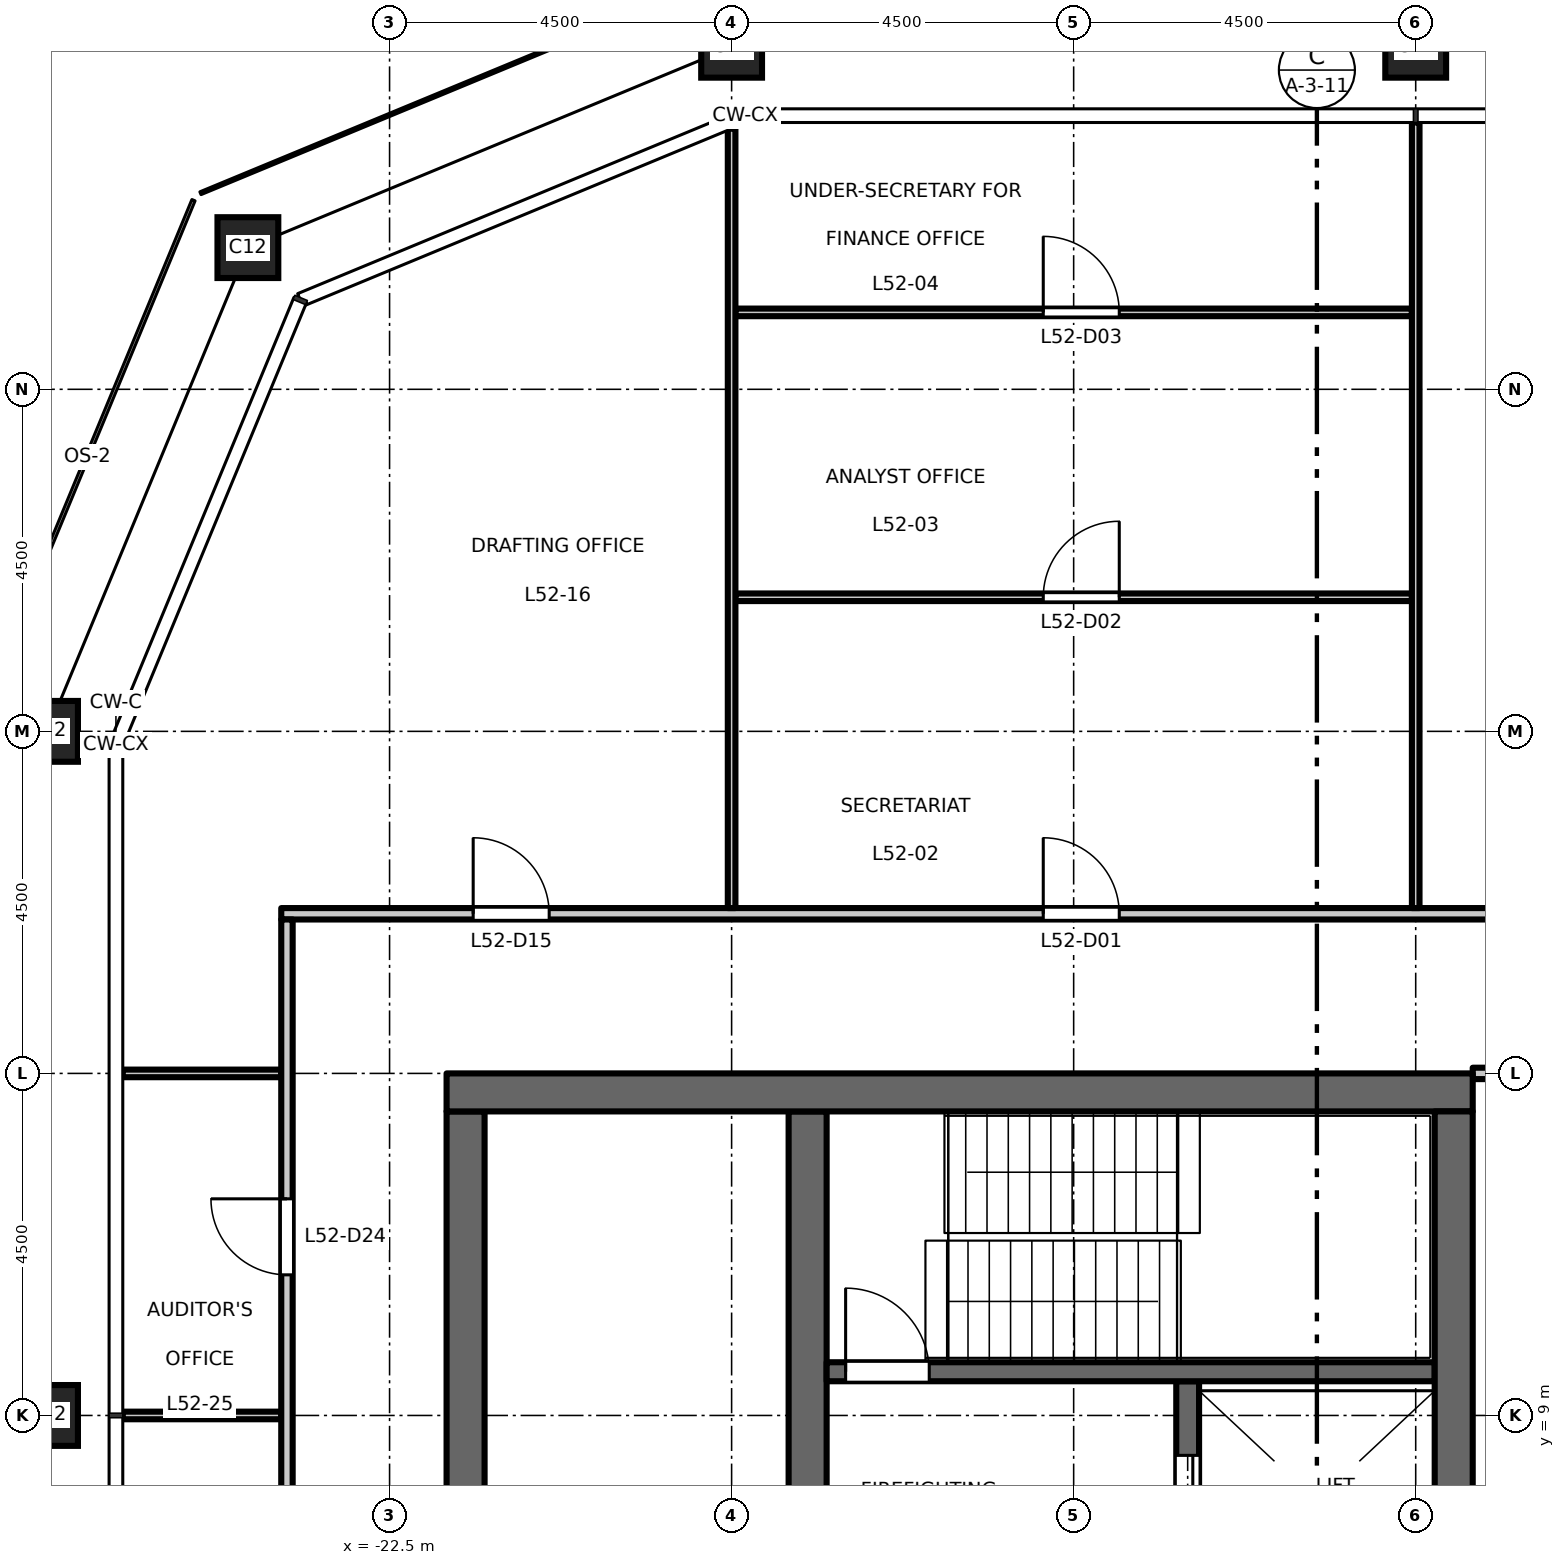
"""IFC4 building model, lengths in metres.
Left out: names, types, materials, properties, quantities, classifications, styles, units other than length and angle.
Written with IfcOpenShell. Run it as: python <this file> out.ifc"""

import sys

from ifc_helpers import new_model, si_unit, direction, frame, frame_2d, origin, origin_2d, place, context, subcontext, project, spatial, rectangle, hollow_rectangle, extrude, element, fill, save


model = new_model("IFC4")
c1 = context("Model", 3, precision=1e-05, world=origin(), true_north=direction((0.0, 1.0)))
c2 = subcontext(c1, "Body", "Model", "MODEL_VIEW")
j1 = project(units=[si_unit("LENGTHUNIT", "METRE"), si_unit("PLANEANGLEUNIT", "RADIAN")], contexts=[c1])
p1 = place(None, origin())
s1 = spatial("IfcSite", under=j1, at=p1, CompositionType="ELEMENT")
p2 = place(p1, origin())
s2 = spatial("IfcBuilding", under=s1, at=p2, CompositionType="ELEMENT")
p3 = place(p2, frame((0.0, 0.0, 242.2)))
s3 = spatial("IfcBuildingStorey", under=s2, at=p3, CompositionType="ELEMENT", Elevation=242.2)
for number, where, z_axis, x_axis in (
    (1, (-9.0, 27.0, 0.0), (0.0, 0.0, 1.0), (1.0, 0.0, 0.0)),
    (2, (-18.0, 27.0, 0.0), (0.0, 0.0, 1.0), (1.0, 0.0, 0.0)),
    (3, (-24.364, 24.364, 0.0), (0.0, 0.0, 1.0), (1.0, 0.0, 0.0)),
    (4, (-27.0, 18.0, 0.0), (0.0, 0.0, 1.0), (1.0, 0.0, 0.0)),
    (5, (-27.0, 9.0, 0.0), (0.0, 0.0, 1.0), (1.0, 0.0, 0.0)),
):
    element("IfcColumn", number, at=place(p3, frame(where, z_axis=z_axis, x_axis=x_axis)), inside=s3, PredefinedType="COLUMN", context=c2, shape_type="SweptSolid", body=[
        extrude(hollow_rectangle(XDim=0.8, YDim=0.8, WallThickness=0.045, at=origin_2d()), origin(), (0.0, 0.0, 1.0), 4.5),
    ])
p4 = place(p3, frame((-12.0, -9.45, 0.0), z_axis=(0.0, 0.0, 1.0), x_axis=(0.0, 1.0, 0.0)))
e6 = element("IfcWall", 6, at=p4, inside=s3, PredefinedType="SHEAR", context=c2, shape_type="SweptSolid", body=[
    extrude(rectangle(XDim=18.9, YDim=0.3, at=frame_2d((9.45, 0.0))), origin(), (0.0, 0.0, 1.0), 4.35),
])
p5 = place(p4, frame((4.725, 0.0, 0.0)))
e7 = element("IfcOpeningElement", 7, at=p5, cuts=e6, PredefinedType="OPENING", context=c2, shape_type="SweptSolid", body=[
    extrude(rectangle(XDim=1.1, YDim=2.1, at=frame_2d((0.55, 1.05))), frame((0.0, 0.16, 0.0), z_axis=(0.0, -1.0, 0.0), x_axis=(1.0, 0.0, 0.0)), (0.0, 0.0, 1.0), 0.32),
])
p6 = place(p4, frame((7.875, 0.0, 0.0)))
e8 = element("IfcOpeningElement", 8, at=p6, cuts=e6, PredefinedType="OPENING", context=c2, shape_type="SweptSolid", body=[
    extrude(rectangle(XDim=1.1, YDim=2.1, at=frame_2d((0.55, 1.05))), frame((0.0, 0.16, 0.0), z_axis=(0.0, -1.0, 0.0), x_axis=(1.0, 0.0, 0.0)), (0.0, 0.0, 1.0), 0.32),
])
p7 = place(p4, frame((11.025, 0.0, 0.0)))
e9 = element("IfcOpeningElement", 9, at=p7, cuts=e6, PredefinedType="OPENING", context=c2, shape_type="SweptSolid", body=[
    extrude(rectangle(XDim=1.1, YDim=2.1, at=frame_2d((0.55, 1.05))), frame((0.0, 0.16, 0.0), z_axis=(0.0, -1.0, 0.0), x_axis=(1.0, 0.0, 0.0)), (0.0, 0.0, 1.0), 0.32),
])
p8 = place(p4, frame((14.175, 0.0, 0.0)))
e10 = element("IfcOpeningElement", 10, at=p8, cuts=e6, PredefinedType="OPENING", context=c2, shape_type="SweptSolid", body=[
    extrude(rectangle(XDim=1.1, YDim=2.1, at=frame_2d((0.55, 1.05))), frame((0.0, 0.16, 0.0), z_axis=(0.0, -1.0, 0.0), x_axis=(1.0, 0.0, 0.0)), (0.0, 0.0, 1.0), 0.32),
])
p9 = place(p4, frame((16.725, 0.0, 0.0)))
e11 = element("IfcOpeningElement", 11, at=p9, cuts=e6, PredefinedType="OPENING", context=c2, shape_type="SweptSolid", body=[
    extrude(rectangle(XDim=1.2, YDim=2.1, at=frame_2d((0.6, 1.05))), frame((0.0, 0.16, 0.0), z_axis=(0.0, -1.0, 0.0), x_axis=(1.0, 0.0, 0.0)), (0.0, 0.0, 1.0), 0.32),
])
p10 = place(p4, frame((0.975, 0.0, 0.0)))
e12 = element("IfcOpeningElement", 12, at=p10, cuts=e6, PredefinedType="OPENING", context=c2, shape_type="SweptSolid", body=[
    extrude(rectangle(XDim=1.2, YDim=2.1, at=frame_2d((0.6, 1.05))), frame((0.0, 0.16, 0.0), z_axis=(0.0, -1.0, 0.0), x_axis=(1.0, 0.0, 0.0)), (0.0, 0.0, 1.0), 0.32),
])
p11 = place(p3, frame((-21.5, -13.0, 0.0), z_axis=(0.0, 0.0, 1.0), x_axis=(0.0, 1.0, 0.0)))
e13 = element("IfcWall", 13, at=p11, inside=s3, PredefinedType="SHEAR", context=c2, shape_type="SweptSolid", body=[
    extrude(rectangle(XDim=26.0, YDim=0.5, at=frame_2d((13.0, 0.0))), origin(), (0.0, 0.0, 1.0), 4.35),
])
p12 = place(p11, frame((16.825, 0.0, 0.0)))
e14 = element("IfcOpeningElement", 14, at=p12, cuts=e13, PredefinedType="OPENING", context=c2, shape_type="SweptSolid", body=[
    extrude(rectangle(XDim=1.8, YDim=2.1, at=frame_2d((0.9, 1.05))), frame((0.0, 0.26, 0.0), z_axis=(0.0, -1.0, 0.0), x_axis=(1.0, 0.0, 0.0)), (0.0, 0.0, 1.0), 0.52),
])
p13 = place(p11, frame((7.375, 0.0, 0.0)))
e15 = element("IfcOpeningElement", 15, at=p13, cuts=e13, PredefinedType="OPENING", context=c2, shape_type="SweptSolid", body=[
    extrude(rectangle(XDim=1.8, YDim=2.1, at=frame_2d((0.9, 1.05))), frame((0.0, 0.26, 0.0), z_axis=(0.0, -1.0, 0.0), x_axis=(1.0, 0.0, 0.0)), (0.0, 0.0, 1.0), 0.52),
])
p14 = place(p3, frame((-17.0, 6.425, 0.0), z_axis=(0.0, 0.0, 1.0), x_axis=(0.0, 1.0, 0.0)))
e16 = element("IfcWall", 16, at=p14, inside=s3, PredefinedType="SHEAR", context=c2, shape_type="SweptSolid", body=[
    extrude(rectangle(XDim=6.575, YDim=0.5, at=frame_2d((3.288, 0.0))), origin(), (0.0, 0.0, 1.0), 4.35),
])
p15 = place(p3, frame((-8.75, 9.575, 0.0), z_axis=(0.0, 0.0, 1.0), x_axis=(-1.0, 0.0, 0.0)))
e17 = element("IfcWall", 17, at=p15, inside=s3, PredefinedType="SHEAR", context=c2, shape_type="SweptSolid", body=[
    extrude(rectangle(XDim=8.0, YDim=0.25, at=frame_2d((4.0, 0.0))), origin(), (0.0, 0.0, 1.0), 4.35),
])
p16 = place(p15, frame((6.65, 0.0, 0.0)))
e18 = element("IfcOpeningElement", 18, at=p16, cuts=e17, PredefinedType="OPENING", context=c2, shape_type="SweptSolid", body=[
    extrude(rectangle(XDim=1.1, YDim=2.1, at=frame_2d((0.55, 1.05))), frame((0.0, 0.135, 0.0), z_axis=(0.0, -1.0, 0.0), x_axis=(1.0, 0.0, 0.0)), (0.0, 0.0, 1.0), 0.27),
])
p17 = place(p3, frame((-8.25, 13.25, 0.0), z_axis=(0.0, 0.0, 1.0), x_axis=(-1.0, 0.0, 0.0)))
e19 = element("IfcWall", 19, at=p17, inside=s3, PredefinedType="SHEAR", context=c2, shape_type="SweptSolid", body=[
    extrude(rectangle(XDim=13.5, YDim=0.5, at=frame_2d((6.75, 0.0))), origin(), (0.0, 0.0, 1.0), 4.35),
])
p18 = place(p3, frame((-8.5, -13.0, 0.0), z_axis=(0.0, 0.0, 1.0), x_axis=(0.0, 1.0, 0.0)))
e20 = element("IfcWall", 20, at=p18, inside=s3, PredefinedType="SHEAR", context=c2, shape_type="SweptSolid", body=[
    extrude(rectangle(XDim=26.0, YDim=0.5, at=frame_2d((13.0, 0.0))), origin(), (0.0, 0.0, 1.0), 4.35),
])
for number, where, z_axis, x_axis in (
    (21, (-26.01, 9.0, 0.0), (0.0, 0.0, 1.0), (1.0, 0.0, 0.0)),
    (22, (-26.01, 13.5, 0.0), (0.0, 0.0, 1.0), (1.0, 0.0, 0.0)),
):
    element("IfcWall", number, at=place(p3, frame(where, z_axis=z_axis, x_axis=x_axis)), inside=s3, PredefinedType="PARTITIONING", context=c2, shape_type="SweptSolid", body=[
        extrude(rectangle(XDim=2.085, YDim=0.1, at=frame_2d((1.042, 0.0))), origin(), (0.0, 0.0, 1.0), 4.35),
    ])
p19 = place(p3, frame((-8.25, 13.5, 0.0), z_axis=(0.0, 0.0, 1.0), x_axis=(1.0, 0.0, 0.0)))
e23 = element("IfcWall", 23, at=p19, inside=s3, PredefinedType="PARTITIONING", context=c2, shape_type="SweptSolid", body=[
    extrude(rectangle(XDim=16.5, YDim=0.15, at=frame_2d((8.25, 0.0))), origin(), (0.0, 0.0, 1.0), 4.35),
])
p20 = place(p19, frame((3.65, 0.0, 0.0)))
e24 = element("IfcOpeningElement", 24, at=p20, cuts=e23, PredefinedType="OPENING", context=c2, shape_type="SweptSolid", body=[
    extrude(rectangle(XDim=1.0, YDim=2.1, at=frame_2d((0.5, 1.05))), frame((0.0, 0.085, 0.0), z_axis=(0.0, -1.0, 0.0), x_axis=(1.0, 0.0, 0.0)), (0.0, 0.0, 1.0), 0.17),
])
p21 = place(p19, frame((11.9, 0.0, 0.0)))
e25 = element("IfcOpeningElement", 25, at=p21, cuts=e23, PredefinedType="OPENING", context=c2, shape_type="SweptSolid", body=[
    extrude(rectangle(XDim=1.0, YDim=2.1, at=frame_2d((0.5, 1.05))), frame((0.0, 0.085, 0.0), z_axis=(0.0, -1.0, 0.0), x_axis=(1.0, 0.0, 0.0)), (0.0, 0.0, 1.0), 0.17),
])
p22 = place(p3, frame((-23.925, 15.6, 0.0), z_axis=(0.0, 0.0, 1.0), x_axis=(1.0, 0.0, 0.0)))
e26 = element("IfcWall", 26, at=p22, inside=s3, PredefinedType="PARTITIONING", context=c2, shape_type="SweptSolid", body=[
    extrude(rectangle(XDim=47.85, YDim=0.15, at=frame_2d((23.925, 0.0))), origin(), (0.0, 0.0, 1.0), 4.35),
])
p23 = place(p22, frame((10.025, 0.0, 0.0)))
e27 = element("IfcOpeningElement", 27, at=p23, cuts=e26, PredefinedType="OPENING", context=c2, shape_type="SweptSolid", body=[
    extrude(rectangle(XDim=1.0, YDim=2.1, at=frame_2d((0.5, 1.05))), frame((0.0, 0.085, 0.0), z_axis=(0.0, -1.0, 0.0), x_axis=(1.0, 0.0, 0.0)), (0.0, 0.0, 1.0), 0.17),
])
p24 = place(p22, frame((19.025, 0.0, 0.0)))
e28 = element("IfcOpeningElement", 28, at=p24, cuts=e26, PredefinedType="OPENING", context=c2, shape_type="SweptSolid", body=[
    extrude(rectangle(XDim=1.0, YDim=2.1, at=frame_2d((0.5, 1.05))), frame((0.0, 0.085, 0.0), z_axis=(0.0, -1.0, 0.0), x_axis=(1.0, 0.0, 0.0)), (0.0, 0.0, 1.0), 0.17),
])
p25 = place(p22, frame((28.025, 0.0, 0.0)))
e29 = element("IfcOpeningElement", 29, at=p25, cuts=e26, PredefinedType="OPENING", context=c2, shape_type="SweptSolid", body=[
    extrude(rectangle(XDim=1.0, YDim=2.1, at=frame_2d((0.5, 1.05))), frame((0.0, 0.085, 0.0), z_axis=(0.0, -1.0, 0.0), x_axis=(1.0, 0.0, 0.0)), (0.0, 0.0, 1.0), 0.17),
])
p26 = place(p22, frame((37.025, 0.0, 0.0)))
e30 = element("IfcOpeningElement", 30, at=p26, cuts=e26, PredefinedType="OPENING", context=c2, shape_type="SweptSolid", body=[
    extrude(rectangle(XDim=1.0, YDim=2.1, at=frame_2d((0.5, 1.05))), frame((0.0, 0.085, 0.0), z_axis=(0.0, -1.0, 0.0), x_axis=(1.0, 0.0, 0.0)), (0.0, 0.0, 1.0), 0.17),
])
p27 = place(p22, frame((2.525, 0.0, 0.0)))
e31 = element("IfcOpeningElement", 31, at=p27, cuts=e26, PredefinedType="OPENING", context=c2, shape_type="SweptSolid", body=[
    extrude(rectangle(XDim=1.0, YDim=2.1, at=frame_2d((0.5, 1.05))), frame((0.0, 0.085, 0.0), z_axis=(0.0, -1.0, 0.0), x_axis=(1.0, 0.0, 0.0)), (0.0, 0.0, 1.0), 0.17),
])
p28 = place(p22, frame((44.375, 0.0, 0.0)))
e32 = element("IfcOpeningElement", 32, at=p28, cuts=e26, PredefinedType="OPENING", context=c2, shape_type="SweptSolid", body=[
    extrude(rectangle(XDim=1.0, YDim=2.1, at=frame_2d((0.5, 1.05))), frame((0.0, 0.085, 0.0), z_axis=(0.0, -1.0, 0.0), x_axis=(1.0, 0.0, 0.0)), (0.0, 0.0, 1.0), 0.17),
])
p29 = place(p3, frame((-17.95, 19.764, 0.0), z_axis=(0.0, 0.0, 1.0), x_axis=(1.0, 0.0, 0.0)))
e33 = element("IfcWall", 33, at=p29, inside=s3, PredefinedType="PARTITIONING", context=c2, shape_type="SweptSolid", body=[
    extrude(rectangle(XDim=8.9, YDim=0.1, at=frame_2d((4.45, 0.0))), origin(), (0.0, 0.0, 1.0), 4.35),
])
p30 = place(p29, frame((4.05, 0.0, 0.0)))
e34 = element("IfcOpeningElement", 34, at=p30, cuts=e33, PredefinedType="OPENING", context=c2, shape_type="SweptSolid", body=[
    extrude(rectangle(XDim=1.0, YDim=2.1, at=frame_2d((0.5, 1.05))), frame((0.0, 0.06, 0.0), z_axis=(0.0, -1.0, 0.0), x_axis=(1.0, 0.0, 0.0)), (0.0, 0.0, 1.0), 0.12),
])
p31 = place(p3, frame((-17.95, 23.512, 0.0), z_axis=(0.0, 0.0, 1.0), x_axis=(1.0, 0.0, 0.0)))
e35 = element("IfcWall", 35, at=p31, inside=s3, PredefinedType="PARTITIONING", context=c2, shape_type="SweptSolid", body=[
    extrude(rectangle(XDim=8.9, YDim=0.1, at=frame_2d((4.45, 0.0))), origin(), (0.0, 0.0, 1.0), 4.35),
])
p32 = place(p31, frame((4.05, 0.0, 0.0)))
e36 = element("IfcOpeningElement", 36, at=p32, cuts=e35, PredefinedType="OPENING", context=c2, shape_type="SweptSolid", body=[
    extrude(rectangle(XDim=1.0, YDim=2.1, at=frame_2d((0.5, 1.05))), frame((0.0, 0.06, 0.0), z_axis=(0.0, -1.0, 0.0), x_axis=(1.0, 0.0, 0.0)), (0.0, 0.0, 1.0), 0.12),
])
p33 = place(p3, frame((-23.85, -15.525, 0.0), z_axis=(0.0, 0.0, 1.0), x_axis=(0.0, 1.0, 0.0)))
e37 = element("IfcWall", 37, at=p33, inside=s3, PredefinedType="PARTITIONING", context=c2, shape_type="SweptSolid", body=[
    extrude(rectangle(XDim=31.05, YDim=0.15, at=frame_2d((15.525, 0.0))), origin(), (0.0, 0.0, 1.0), 4.35),
])
p34 = place(p33, frame((3.875, 0.0, 0.0)))
e38 = element("IfcOpeningElement", 38, at=p34, cuts=e37, PredefinedType="OPENING", context=c2, shape_type="SweptSolid", body=[
    extrude(rectangle(XDim=1.0, YDim=2.1, at=frame_2d((0.5, 1.05))), frame((0.0, 0.085, 0.0), z_axis=(0.0, -1.0, 0.0), x_axis=(1.0, 0.0, 0.0)), (0.0, 0.0, 1.0), 0.17),
])
p35 = place(p33, frame((10.625, 0.0, 0.0)))
e39 = element("IfcOpeningElement", 39, at=p35, cuts=e37, PredefinedType="OPENING", context=c2, shape_type="SweptSolid", body=[
    extrude(rectangle(XDim=1.0, YDim=2.1, at=frame_2d((0.5, 1.05))), frame((0.0, 0.085, 0.0), z_axis=(0.0, -1.0, 0.0), x_axis=(1.0, 0.0, 0.0)), (0.0, 0.0, 1.0), 0.17),
])
p36 = place(p33, frame((19.625, 0.0, 0.0)))
e40 = element("IfcOpeningElement", 40, at=p36, cuts=e37, PredefinedType="OPENING", context=c2, shape_type="SweptSolid", body=[
    extrude(rectangle(XDim=1.0, YDim=2.1, at=frame_2d((0.5, 1.05))), frame((0.0, 0.085, 0.0), z_axis=(0.0, -1.0, 0.0), x_axis=(1.0, 0.0, 0.0)), (0.0, 0.0, 1.0), 0.17),
])
p37 = place(p33, frame((26.375, 0.0, 0.0)))
e41 = element("IfcOpeningElement", 41, at=p37, cuts=e37, PredefinedType="OPENING", context=c2, shape_type="SweptSolid", body=[
    extrude(rectangle(XDim=1.0, YDim=2.1, at=frame_2d((0.5, 1.05))), frame((0.0, 0.085, 0.0), z_axis=(0.0, -1.0, 0.0), x_axis=(1.0, 0.0, 0.0)), (0.0, 0.0, 1.0), 0.17),
])
p38 = place(p3, frame((-18.0, 15.675, 0.0), z_axis=(0.0, 0.0, 1.0), x_axis=(0.0, 1.0, 0.0)))
e42 = element("IfcWall", 42, at=p38, inside=s3, PredefinedType="PARTITIONING", context=c2, shape_type="SweptSolid", body=[
    extrude(rectangle(XDim=10.253, YDim=0.1, at=frame_2d((5.126, 0.0))), origin(), (0.0, 0.0, 1.0), 3.65),
])
p39 = place(p3, frame((-9.0, 15.675, 0.0), z_axis=(0.0, 0.0, 1.0), x_axis=(0.0, 1.0, 0.0)))
e43 = element("IfcWall", 43, at=p39, inside=s3, PredefinedType="PARTITIONING", context=c2, shape_type="SweptSolid", body=[
    extrude(rectangle(XDim=10.335, YDim=0.1, at=frame_2d((5.167, 0.0))), origin(), (0.0, 0.0, 1.0), 3.65),
])
p40 = place(p16, origin())
e44 = element("IfcDoor", 44, at=p40, inside=s3, OperationType="SINGLE_SWING_RIGHT", PredefinedType="DOOR", context=c2, shape_type="SweptSolid", body=[
    extrude(rectangle(XDim=1.1, YDim=2.1, at=frame_2d((0.55, 1.05))), frame((0.0, 0.025, 0.0), z_axis=(0.0, -1.0, 0.0), x_axis=(1.0, 0.0, 0.0)), (0.0, 0.0, 1.0), 0.05),
])
fill(e18, e44)
p41 = place(p9, origin())
e45 = element("IfcDoor", 45, at=p41, inside=s3, OperationType="DOUBLE_DOOR_SLIDING", PredefinedType="DOOR", context=c2, shape_type="SweptSolid", body=[
    extrude(rectangle(XDim=1.2, YDim=2.1, at=frame_2d((0.6, 1.05))), frame((0.0, 0.025, 0.0), z_axis=(0.0, -1.0, 0.0), x_axis=(1.0, 0.0, 0.0)), (0.0, 0.0, 1.0), 0.05),
])
fill(e11, e45)
p42 = place(p23, origin())
e46 = element("IfcDoor", 46, at=p42, inside=s3, OperationType="SINGLE_SWING_LEFT", PredefinedType="DOOR", context=c2, shape_type="SweptSolid", body=[
    extrude(rectangle(XDim=1.0, YDim=2.1, at=frame_2d((0.5, 1.05))), frame((0.0, 0.025, 0.0), z_axis=(0.0, -1.0, 0.0), x_axis=(1.0, 0.0, 0.0)), (0.0, 0.0, 1.0), 0.05),
])
fill(e27, e46)
p43 = place(p30, origin())
e47 = element("IfcDoor", 47, at=p43, inside=s3, OperationType="SINGLE_SWING_RIGHT", PredefinedType="DOOR", context=c2, shape_type="SweptSolid", body=[
    extrude(rectangle(XDim=1.0, YDim=2.1, at=frame_2d((0.5, 1.05))), frame((0.0, 0.025, 0.0), z_axis=(0.0, -1.0, 0.0), x_axis=(1.0, 0.0, 0.0)), (0.0, 0.0, 1.0), 0.05),
])
fill(e34, e47)
p44 = place(p32, origin())
e48 = element("IfcDoor", 48, at=p44, inside=s3, OperationType="SINGLE_SWING_LEFT", PredefinedType="DOOR", context=c2, shape_type="SweptSolid", body=[
    extrude(rectangle(XDim=1.0, YDim=2.1, at=frame_2d((0.5, 1.05))), frame((0.0, 0.025, 0.0), z_axis=(0.0, -1.0, 0.0), x_axis=(1.0, 0.0, 0.0)), (0.0, 0.0, 1.0), 0.05),
])
fill(e36, e48)
p45 = place(p27, origin())
e49 = element("IfcDoor", 49, at=p45, inside=s3, OperationType="SINGLE_SWING_LEFT", PredefinedType="DOOR", context=c2, shape_type="SweptSolid", body=[
    extrude(rectangle(XDim=1.0, YDim=2.1, at=frame_2d((0.5, 1.05))), frame((0.0, 0.025, 0.0), z_axis=(0.0, -1.0, 0.0), x_axis=(1.0, 0.0, 0.0)), (0.0, 0.0, 1.0), 0.05),
])
fill(e31, e49)
p46 = place(p37, origin())
e50 = element("IfcDoor", 50, at=p46, inside=s3, OperationType="SINGLE_SWING_RIGHT", PredefinedType="DOOR", context=c2, shape_type="SweptSolid", body=[
    extrude(rectangle(XDim=1.0, YDim=2.1, at=frame_2d((0.5, 1.05))), frame((0.0, 0.025, 0.0), z_axis=(0.0, -1.0, 0.0), x_axis=(1.0, 0.0, 0.0)), (0.0, 0.0, 1.0), 0.05),
])
fill(e41, e50)
save(model, sys.argv[1])
